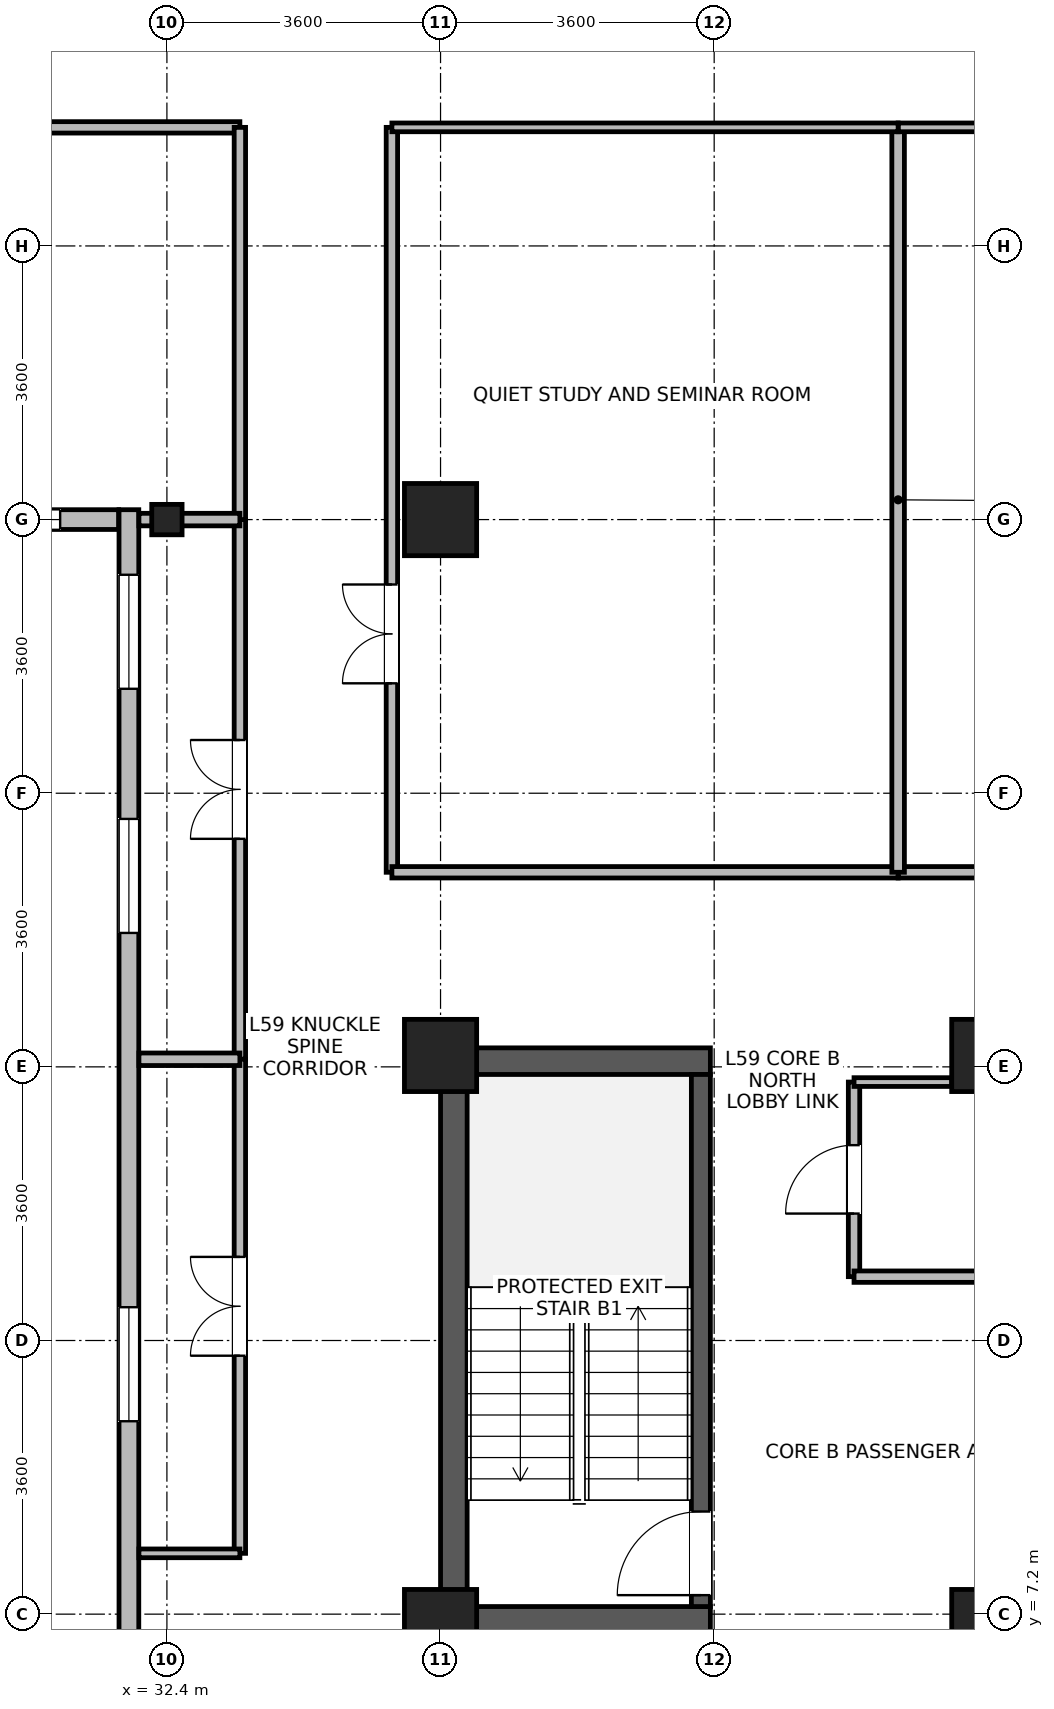
"""IFC4 building model, lengths in metres.
Left out: names, types, materials, properties, quantities, classifications, styles, units other than length and angle.
Written with IfcOpenShell. Run it as: python <this file> out.ifc"""

import sys

from ifc_helpers import new_model, si_unit, direction, frame, frame_2d, origin, origin_2d, place, context, subcontext, project, spatial, rectangle, i_section, extrude, source, transform, mapped, element, fill, save


model = new_model("IFC4")
c1 = context("Model", 3, precision=1e-05, world=origin(), true_north=direction((0.0, 1.0)))
c2 = subcontext(c1, "Body", "Model", "MODEL_VIEW")
j1 = project(units=[si_unit("LENGTHUNIT", "METRE"), si_unit("PLANEANGLEUNIT", "RADIAN")], contexts=[c1])
p1 = place(None, origin())
s1 = spatial("IfcSite", under=j1, at=p1, CompositionType="ELEMENT")
p2 = place(p1, origin())
s2 = spatial("IfcBuilding", under=s1, at=p2, CompositionType="ELEMENT")
p3 = place(p2, frame((0.0, 0.0, 231.4)))
s3 = spatial("IfcBuildingStorey", under=s2, at=p3, CompositionType="ELEMENT", Elevation=231.4)
p4 = place(p3, frame((36.175, 6.95, 0.0), z_axis=(0.0, 0.0, 1.0), x_axis=(0.0, 1.0, 0.0)))
e1 = element("IfcWall", 1, at=p4, inside=s3, PredefinedType="SHEAR", context=c2, shape_type="SweptSolid", body=[
    extrude(rectangle(XDim=7.7, YDim=0.35, at=frame_2d((3.85, 0.0))), origin(), (0.0, 0.0, 1.0), 3.44),
])
for number, where, z_axis, x_axis in (
    (2, (36.35, 7.125, 0.0), (0.0, 0.0, 1.0), (1.0, 0.0, 0.0)),
    (3, (36.35, 14.475, 0.0), (0.0, 0.0, 1.0), (1.0, 0.0, 0.0)),
):
    element("IfcWall", number, at=place(p3, frame(where, z_axis=z_axis, x_axis=x_axis)), inside=s3, PredefinedType="SHEAR", context=c2, shape_type="SweptSolid", body=[
        extrude(rectangle(XDim=3.2, YDim=0.35, at=frame_2d((1.6, 0.0))), origin(), (0.0, 0.0, 1.0), 3.44),
    ])
p5 = place(p3, frame((39.425, 7.3, 0.0), z_axis=(0.0, 0.0, 1.0), x_axis=(0.0, 1.0, 0.0)))
e4 = element("IfcWall", 4, at=p5, inside=s3, PredefinedType="SHEAR", context=c2, shape_type="SweptSolid", body=[
    extrude(rectangle(XDim=7.0, YDim=0.25, at=frame_2d((3.5, 0.0))), origin(), (0.0, 0.0, 1.0), 3.44),
])
p6 = place(p5, frame((0.15, 0.0, 0.0)))
e5 = element("IfcOpeningElement", 5, at=p6, cuts=e4, PredefinedType="OPENING", context=c2, shape_type="SweptSolid", body=[
    extrude(rectangle(XDim=1.1, YDim=2.08, at=frame_2d((0.55, 1.04))), frame((0.0, 0.135, 0.0), z_axis=(0.0, -1.0, 0.0), x_axis=(1.0, 0.0, 0.0)), (0.0, 0.0, 1.0), 0.27),
])
m1 = source(origin(), c2, "Body", "SweptSolid", [
    extrude(rectangle(XDim=0.95, YDim=0.95, at=origin_2d()), origin(), (0.0, 0.0, 1.0), 3.7),
])
for number, where, z_axis, x_axis in (
    (6, (36.0, 21.6, 0.0), (0.0, 0.0, 1.0), (1.0, 0.0, 0.0)),
    (7, (36.0, 7.05, 0.0), (0.0, 0.0, 1.0), (1.0, 0.0, 0.0)),
    (8, (36.0, 14.55, 0.0), (0.0, 0.0, 1.0), (1.0, 0.0, 0.0)),
    (9, (43.2, 7.05, 0.0), (0.0, 0.0, 1.0), (1.0, 0.0, 0.0)),
    (10, (43.2, 14.55, 0.0), (0.0, 0.0, 1.0), (1.0, 0.0, 0.0)),
):
    element("IfcColumn", number, at=place(p3, frame(where, z_axis=z_axis, x_axis=x_axis)), inside=s3, PredefinedType="COLUMN", context=c2, shape_type="MappedRepresentation", body=[
        mapped(m1, transform((0.0, 0.0, 0.0), x_axis=(1.0, 0.0, 0.0), y_axis=(0.0, 1.0, 0.0), z_axis=(0.0, 0.0, 1.0), scale=1.0)),
    ])
m2 = source(origin(), c2, "Body", "SweptSolid", [
    extrude(i_section(OverallWidth=0.399, OverallDepth=0.4, WebThickness=0.017, FlangeThickness=0.023, FilletRadius=0.015, at=origin_2d()), origin(), (0.0, 0.0, 1.0), 3.7),
])
p7 = place(p3, frame((32.4, 21.6, 0.0), z_axis=(0.0, 0.0, 1.0), x_axis=(1.0, 0.0, 0.0)))
e11 = element("IfcColumn", 11, at=p7, inside=s3, PredefinedType="COLUMN", context=c2, shape_type="MappedRepresentation", body=[
    mapped(m2, transform((0.0, 0.0, 0.0), x_axis=(1.0, 0.0, 0.0), y_axis=(0.0, 1.0, 0.0), z_axis=(0.0, 0.0, 1.0), scale=1.0)),
])
p8 = place(p3, frame((31.765, 21.6, 0.0), z_axis=(0.0, 0.0, 1.0), x_axis=(-1.0, 0.0, 0.0)))
e12 = element("IfcWall", 12, at=p8, inside=s3, PredefinedType="STANDARD", context=c2, shape_type="SweptSolid", body=[
    extrude(rectangle(XDim=2.489, YDim=0.26, at=frame_2d((1.245, 0.0))), origin(), (0.0, 0.0, 1.0), 3.02),
])
p9 = place(p8, frame((0.77, 0.0, 0.85)))
e13 = element("IfcOpeningElement", 13, at=p9, cuts=e12, PredefinedType="OPENING", context=c2, shape_type="SweptSolid", body=[
    extrude(rectangle(XDim=0.95, YDim=1.75, at=frame_2d((0.475, 0.875))), frame((0.0, 0.14, 0.0), z_axis=(0.0, -1.0, 0.0), x_axis=(1.0, 0.0, 0.0)), (0.0, 0.0, 1.0), 0.28),
])
p10 = place(p3, frame((31.9, 5.67, 0.0), z_axis=(0.0, 0.0, 1.0), x_axis=(0.0, 1.0, 0.0)))
e14 = element("IfcWall", 14, at=p10, inside=s3, PredefinedType="STANDARD", context=c2, shape_type="SweptSolid", body=[
    extrude(rectangle(XDim=16.06, YDim=0.26, at=frame_2d((8.03, 0.0))), origin(), (0.0, 0.0, 1.0), 3.42),
])
p11 = place(p10, frame((4.068, 0.0, 0.85)))
e15 = element("IfcOpeningElement", 15, at=p11, cuts=e14, PredefinedType="OPENING", context=c2, shape_type="SweptSolid", body=[
    extrude(rectangle(XDim=1.5, YDim=1.85, at=frame_2d((0.75, 0.925))), frame((0.0, 0.14, 0.0), z_axis=(0.0, -1.0, 0.0), x_axis=(1.0, 0.0, 0.0)), (0.0, 0.0, 1.0), 0.28),
])
p12 = place(p10, frame((10.492, 0.0, 0.85)))
e16 = element("IfcOpeningElement", 16, at=p12, cuts=e14, PredefinedType="OPENING", context=c2, shape_type="SweptSolid", body=[
    extrude(rectangle(XDim=1.5, YDim=1.85, at=frame_2d((0.75, 0.925))), frame((0.0, 0.14, 0.0), z_axis=(0.0, -1.0, 0.0), x_axis=(1.0, 0.0, 0.0)), (0.0, 0.0, 1.0), 0.28),
])
p13 = place(p10, frame((13.704, 0.0, 0.85)))
e17 = element("IfcOpeningElement", 17, at=p13, cuts=e14, PredefinedType="OPENING", context=c2, shape_type="SweptSolid", body=[
    extrude(rectangle(XDim=1.5, YDim=1.85, at=frame_2d((0.75, 0.925))), frame((0.0, 0.14, 0.0), z_axis=(0.0, -1.0, 0.0), x_axis=(1.0, 0.0, 0.0)), (0.0, 0.0, 1.0), 0.28),
])
p14 = place(p3, frame((35.36, 16.96, 0.0), z_axis=(0.0, 0.0, 1.0), x_axis=(0.0, 1.0, 0.0)))
e18 = element("IfcWall", 18, at=p14, inside=s3, PredefinedType="PARTITIONING", context=c2, shape_type="SweptSolid", body=[
    extrude(rectangle(XDim=9.8, YDim=0.15, at=frame_2d((4.9, 0.0))), origin(), (0.0, 0.0, 1.0), 3.42),
])
p15 = place(p14, frame((2.486, 0.0, 0.0)))
e19 = element("IfcOpeningElement", 19, at=p15, cuts=e18, PredefinedType="OPENING", context=c2, shape_type="SweptSolid", body=[
    extrude(rectangle(XDim=1.3, YDim=2.12, at=frame_2d((0.65, 1.06))), frame((0.0, 0.085, 0.0), z_axis=(0.0, -1.0, 0.0), x_axis=(1.0, 0.0, 0.0)), (0.0, 0.0, 1.0), 0.17),
])
p16 = place(p3, frame((42.02, 16.96, 0.0), z_axis=(0.0, 0.0, 1.0), x_axis=(1.0, 0.0, 0.0)))
e20 = element("IfcWall", 20, at=p16, inside=s3, PredefinedType="PARTITIONING", context=c2, shape_type="SweptSolid", body=[
    extrude(rectangle(XDim=7.2, YDim=0.15, at=frame_2d((3.6, 0.0))), origin(), (0.0, 0.0, 1.0), 3.42),
])
p17 = place(p16, frame((2.95, 0.0, 0.0)))
e21 = element("IfcOpeningElement", 21, at=p17, cuts=e20, PredefinedType="OPENING", context=c2, shape_type="SweptSolid", body=[
    extrude(rectangle(XDim=1.3, YDim=2.12, at=frame_2d((0.65, 1.06))), frame((0.0, 0.085, 0.0), z_axis=(0.0, -1.0, 0.0), x_axis=(1.0, 0.0, 0.0)), (0.0, 0.0, 1.0), 0.17),
])
p18 = place(p3, frame((33.36, 14.5, 0.0), z_axis=(0.0, 0.0, 1.0), x_axis=(0.0, 1.0, 0.0)))
e22 = element("IfcWall", 22, at=p18, inside=s3, PredefinedType="PARTITIONING", context=c2, shape_type="SweptSolid", body=[
    extrude(rectangle(XDim=7.1, YDim=0.15, at=frame_2d((3.55, 0.0))), origin(), (0.0, 0.0, 1.0), 3.42),
])
p19 = place(p18, frame((2.9, 0.0, 0.0)))
e23 = element("IfcOpeningElement", 23, at=p19, cuts=e22, PredefinedType="OPENING", context=c2, shape_type="SweptSolid", body=[
    extrude(rectangle(XDim=1.3, YDim=2.12, at=frame_2d((0.65, 1.06))), frame((0.0, 0.085, 0.0), z_axis=(0.0, -1.0, 0.0), x_axis=(1.0, 0.0, 0.0)), (0.0, 0.0, 1.0), 0.17),
])
p20 = place(p3, frame((35.36, 16.96, 0.0), z_axis=(0.0, 0.0, 1.0), x_axis=(1.0, 0.0, 0.0)))
e24 = element("IfcWall", 24, at=p20, inside=s3, PredefinedType="PARTITIONING", context=c2, shape_type="SweptSolid", body=[
    extrude(rectangle(XDim=6.66, YDim=0.15, at=frame_2d((3.33, 0.0))), origin(), (0.0, 0.0, 1.0), 3.42),
])
p21 = place(p3, frame((26.7, 26.76, 0.0), z_axis=(0.0, 0.0, 1.0), x_axis=(1.0, 0.0, 0.0)))
e25 = element("IfcWall", 25, at=p21, inside=s3, PredefinedType="PARTITIONING", context=c2, shape_type="SweptSolid", body=[
    extrude(rectangle(XDim=6.66, YDim=0.15, at=frame_2d((3.33, 0.0))), origin(), (0.0, 0.0, 1.0), 3.42),
])
p22 = place(p21, frame((2.855, 0.0, 0.0)))
e26 = element("IfcOpeningElement", 26, at=p22, cuts=e25, PredefinedType="OPENING", context=c2, shape_type="SweptSolid", body=[
    extrude(rectangle(XDim=0.95, YDim=2.1, at=frame_2d((0.475, 1.05))), frame((0.0, 0.085, 0.0), z_axis=(0.0, -1.0, 0.0), x_axis=(1.0, 0.0, 0.0)), (0.0, 0.0, 1.0), 0.17),
])
p23 = place(p3, frame((33.36, 8.0, 0.0), z_axis=(0.0, 0.0, 1.0), x_axis=(0.0, 1.0, 0.0)))
e27 = element("IfcWall", 27, at=p23, inside=s3, PredefinedType="PARTITIONING", context=c2, shape_type="SweptSolid", body=[
    extrude(rectangle(XDim=6.5, YDim=0.15, at=frame_2d((3.25, 0.0))), origin(), (0.0, 0.0, 1.0), 3.42),
])
p24 = place(p23, frame((2.6, 0.0, 0.0)))
e28 = element("IfcOpeningElement", 28, at=p24, cuts=e27, PredefinedType="OPENING", context=c2, shape_type="SweptSolid", body=[
    extrude(rectangle(XDim=1.3, YDim=2.12, at=frame_2d((0.65, 1.06))), frame((0.0, 0.085, 0.0), z_axis=(0.0, -1.0, 0.0), x_axis=(1.0, 0.0, 0.0)), (0.0, 0.0, 1.0), 0.17),
])
p25 = place(p3, frame((33.36, 21.6, 0.0), z_axis=(0.0, 0.0, 1.0), x_axis=(0.0, 1.0, 0.0)))
e29 = element("IfcWall", 29, at=p25, inside=s3, PredefinedType="PARTITIONING", context=c2, shape_type="SweptSolid", body=[
    extrude(rectangle(XDim=5.16, YDim=0.15, at=frame_2d((2.58, 0.0))), origin(), (0.0, 0.0, 1.0), 3.42),
])
p26 = place(p3, frame((41.44, 11.64, 0.0), z_axis=(0.0, 0.0, 1.0), x_axis=(0.0, 1.0, 0.0)))
e30 = element("IfcWall", 30, at=p26, inside=s3, PredefinedType="PARTITIONING", context=c2, shape_type="SweptSolid", body=[
    extrude(rectangle(XDim=2.56, YDim=0.15, at=frame_2d((1.28, 0.0))), origin(), (0.0, 0.0, 1.0), 3.42),
])
p27 = place(p26, frame((0.83, 0.0, 0.0)))
e31 = element("IfcOpeningElement", 31, at=p27, cuts=e30, PredefinedType="OPENING", context=c2, shape_type="SweptSolid", body=[
    extrude(rectangle(XDim=0.9, YDim=2.08, at=frame_2d((0.45, 1.04))), frame((0.0, 0.085, 0.0), z_axis=(0.0, -1.0, 0.0), x_axis=(1.0, 0.0, 0.0)), (0.0, 0.0, 1.0), 0.17),
])
p28 = place(p3, frame((41.44, 11.64, 0.0), z_axis=(0.0, 0.0, 1.0), x_axis=(1.0, 0.0, 0.0)))
e32 = element("IfcWall", 32, at=p28, inside=s3, PredefinedType="PARTITIONING", context=c2, shape_type="SweptSolid", body=[
    extrude(rectangle(XDim=2.36, YDim=0.15, at=frame_2d((1.18, 0.0))), origin(), (0.0, 0.0, 1.0), 3.42),
])
p29 = place(p3, frame((42.02, 16.96, 0.0), z_axis=(0.0, 0.0, 1.0), x_axis=(0.0, 1.0, 0.0)))
e33 = element("IfcWall", 33, at=p29, inside=s3, PredefinedType="PARTITIONING", context=c2, shape_type="SweptSolid", body=[
    extrude(rectangle(XDim=9.8, YDim=0.165, at=frame_2d((4.9, 0.0))), origin(), (0.0, 0.0, 1.0), 3.42),
])
p30 = place(p3, frame((42.02, 26.76, 0.0), z_axis=(0.0, 0.0, 1.0), x_axis=(1.0, 0.0, 0.0)))
e34 = element("IfcWall", 34, at=p30, inside=s3, PredefinedType="PARTITIONING", context=c2, shape_type="SweptSolid", body=[
    extrude(rectangle(XDim=7.2, YDim=0.115, at=frame_2d((3.6, 0.0))), origin(), (0.0, 0.0, 1.0), 3.42),
])
p31 = place(p3, frame((35.36, 26.76, 0.0), z_axis=(0.0, 0.0, 1.0), x_axis=(1.0, 0.0, 0.0)))
e35 = element("IfcWall", 35, at=p31, inside=s3, PredefinedType="PARTITIONING", context=c2, shape_type="SweptSolid", body=[
    extrude(rectangle(XDim=6.66, YDim=0.115, at=frame_2d((3.33, 0.0))), origin(), (0.0, 0.0, 1.0), 3.42),
])
p32 = place(p3, frame((41.44, 14.2, 0.0), z_axis=(0.0, 0.0, 1.0), x_axis=(1.0, 0.0, 0.0)))
e36 = element("IfcWall", 36, at=p32, inside=s3, PredefinedType="PARTITIONING", context=c2, shape_type="SweptSolid", body=[
    extrude(rectangle(XDim=1.285, YDim=0.115, at=frame_2d((0.643, 0.0))), origin(), (0.0, 0.0, 1.0), 2.52),
])
p33 = place(p3, frame((32.032, 8.0, 0.0), z_axis=(0.0, 0.0, 1.0), x_axis=(1.0, 0.0, 0.0)))
e37 = element("IfcWall", 37, at=p33, inside=s3, PredefinedType="PARTITIONING", context=c2, shape_type="SweptSolid", body=[
    extrude(rectangle(XDim=1.328, YDim=0.115, at=frame_2d((0.664, 0.0))), origin(), (0.0, 0.0, 1.0), 3.42),
])
p34 = place(p3, frame((32.032, 14.5, 0.0), z_axis=(0.0, 0.0, 1.0), x_axis=(1.0, 0.0, 0.0)))
e38 = element("IfcWall", 38, at=p34, inside=s3, PredefinedType="PARTITIONING", context=c2, shape_type="SweptSolid", body=[
    extrude(rectangle(XDim=1.328, YDim=0.165, at=frame_2d((0.664, 0.0))), origin(), (0.0, 0.0, 1.0), 3.42),
])
p35 = place(p3, frame((32.032, 21.6, 0.0), z_axis=(0.0, 0.0, 1.0), x_axis=(1.0, 0.0, 0.0)))
e39 = element("IfcWall", 39, at=p35, inside=s3, PredefinedType="PARTITIONING", context=c2, shape_type="SweptSolid", body=[
    extrude(rectangle(XDim=1.328, YDim=0.165, at=frame_2d((0.664, 0.0))), origin(), (0.0, 0.0, 1.0), 3.02),
])
p36 = place(p9, origin())
e40 = element("IfcWindow", 40, at=p36, inside=s3, PartitioningType="SINGLE_PANEL", PredefinedType="WINDOW", context=c2, shape_type="SweptSolid", body=[
    extrude(rectangle(XDim=0.95, YDim=1.75, at=frame_2d((0.475, 0.875))), frame((0.0, 0.03, 0.0), z_axis=(0.0, -1.0, 0.0), x_axis=(1.0, 0.0, 0.0)), (0.0, 0.0, 1.0), 0.06),
])
fill(e13, e40)
p37 = place(p11, origin())
e41 = element("IfcWindow", 41, at=p37, inside=s3, PartitioningType="SINGLE_PANEL", PredefinedType="WINDOW", context=c2, shape_type="SweptSolid", body=[
    extrude(rectangle(XDim=1.5, YDim=1.85, at=frame_2d((0.75, 0.925))), frame((0.0, 0.03, 0.0), z_axis=(0.0, -1.0, 0.0), x_axis=(1.0, 0.0, 0.0)), (0.0, 0.0, 1.0), 0.06),
])
fill(e15, e41)
p38 = place(p12, origin())
e42 = element("IfcWindow", 42, at=p38, inside=s3, PartitioningType="SINGLE_PANEL", PredefinedType="WINDOW", context=c2, shape_type="SweptSolid", body=[
    extrude(rectangle(XDim=1.5, YDim=1.85, at=frame_2d((0.75, 0.925))), frame((0.0, 0.03, 0.0), z_axis=(0.0, -1.0, 0.0), x_axis=(1.0, 0.0, 0.0)), (0.0, 0.0, 1.0), 0.06),
])
fill(e16, e42)
p39 = place(p13, origin())
e43 = element("IfcWindow", 43, at=p39, inside=s3, PartitioningType="SINGLE_PANEL", PredefinedType="WINDOW", context=c2, shape_type="SweptSolid", body=[
    extrude(rectangle(XDim=1.5, YDim=1.85, at=frame_2d((0.75, 0.925))), frame((0.0, 0.03, 0.0), z_axis=(0.0, -1.0, 0.0), x_axis=(1.0, 0.0, 0.0)), (0.0, 0.0, 1.0), 0.06),
])
fill(e17, e43)
p40 = place(p6, origin())
e44 = element("IfcDoor", 44, at=p40, inside=s3, OperationType="SINGLE_SWING_LEFT", PredefinedType="DOOR", context=c2, shape_type="SweptSolid", body=[
    extrude(rectangle(XDim=1.1, YDim=2.08, at=frame_2d((0.55, 1.04))), frame((0.0, 0.025, 0.0), z_axis=(0.0, -1.0, 0.0), x_axis=(1.0, 0.0, 0.0)), (0.0, 0.0, 1.0), 0.05),
])
fill(e5, e44)
p41 = place(p15, origin())
e45 = element("IfcDoor", 45, at=p41, inside=s3, OperationType="DOUBLE_DOOR_SINGLE_SWING", PredefinedType="DOOR", context=c2, shape_type="SweptSolid", body=[
    extrude(rectangle(XDim=1.3, YDim=2.12, at=frame_2d((0.65, 1.06))), frame((0.0, 0.025, 0.0), z_axis=(0.0, -1.0, 0.0), x_axis=(1.0, 0.0, 0.0)), (0.0, 0.0, 1.0), 0.05),
])
fill(e19, e45)
p42 = place(p19, origin())
e46 = element("IfcDoor", 46, at=p42, inside=s3, OperationType="DOUBLE_DOOR_SINGLE_SWING", PredefinedType="DOOR", context=c2, shape_type="SweptSolid", body=[
    extrude(rectangle(XDim=1.3, YDim=2.12, at=frame_2d((0.65, 1.06))), frame((0.0, 0.025, 0.0), z_axis=(0.0, -1.0, 0.0), x_axis=(1.0, 0.0, 0.0)), (0.0, 0.0, 1.0), 0.05),
])
fill(e23, e46)
p43 = place(p24, origin())
e47 = element("IfcDoor", 47, at=p43, inside=s3, OperationType="DOUBLE_DOOR_SINGLE_SWING", PredefinedType="DOOR", context=c2, shape_type="SweptSolid", body=[
    extrude(rectangle(XDim=1.3, YDim=2.12, at=frame_2d((0.65, 1.06))), frame((0.0, 0.025, 0.0), z_axis=(0.0, -1.0, 0.0), x_axis=(1.0, 0.0, 0.0)), (0.0, 0.0, 1.0), 0.05),
])
fill(e28, e47)
p44 = place(p27, origin())
e48 = element("IfcDoor", 48, at=p44, inside=s3, OperationType="SINGLE_SWING_LEFT", PredefinedType="DOOR", context=c2, shape_type="SweptSolid", body=[
    extrude(rectangle(XDim=0.9, YDim=2.08, at=frame_2d((0.45, 1.04))), frame((0.0, 0.025, 0.0), z_axis=(0.0, -1.0, 0.0), x_axis=(1.0, 0.0, 0.0)), (0.0, 0.0, 1.0), 0.05),
])
fill(e31, e48)
save(model, sys.argv[1])
